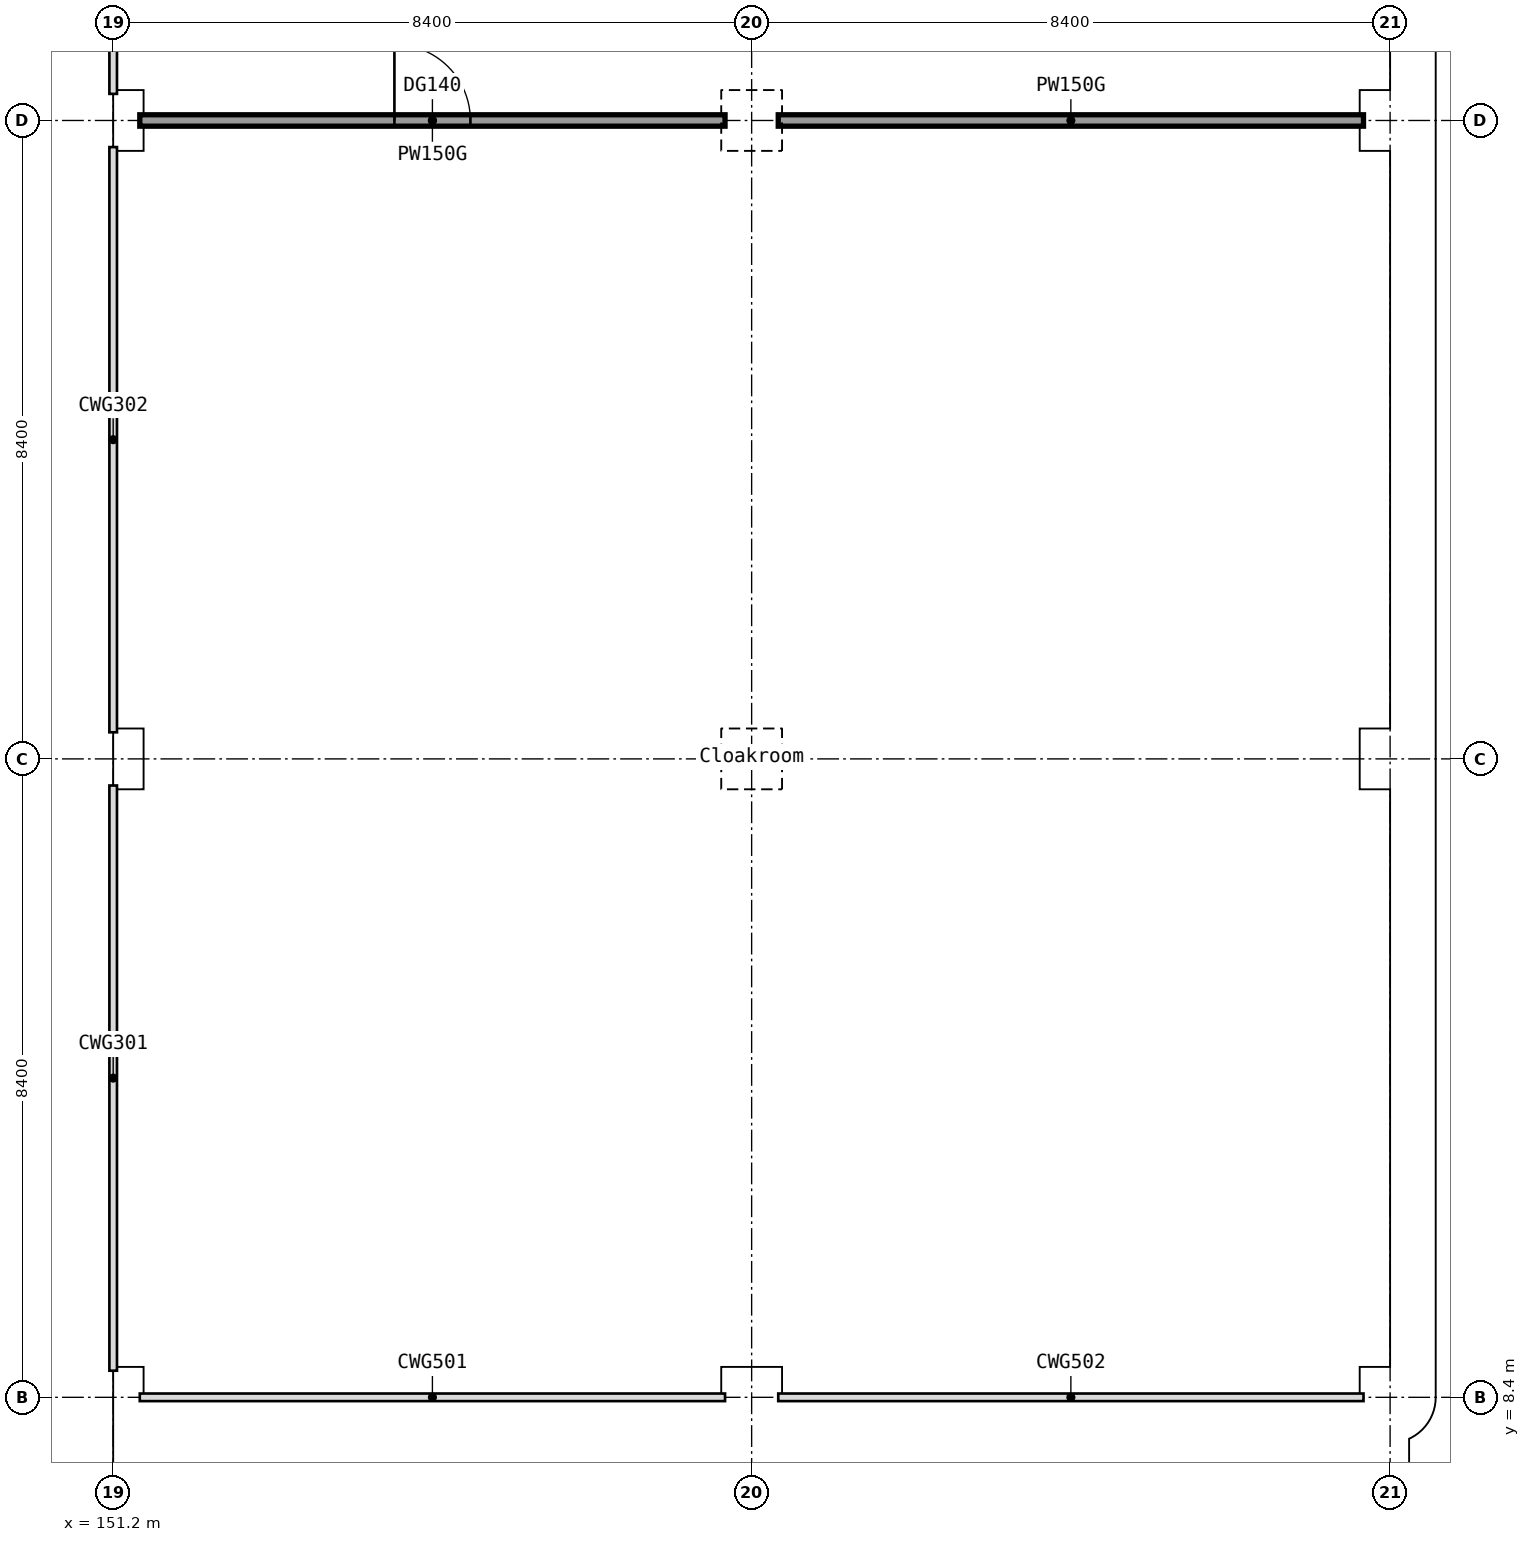
"""IFC4 building model, lengths in metres.
Left out: names, types, materials, properties, quantities, classifications, styles, units other than length and angle.
Written with IfcOpenShell. Run it as: python <this file> out.ifc"""

import sys

from ifc_helpers import new_model, si_unit, direction, frame, frame_2d, origin, origin_2d, place, context, subcontext, project, spatial, rectangle, extrude, element, fill, save


model = new_model("IFC4")
c1 = context("Model", 3, precision=1e-05, world=origin(), true_north=direction((0.0, 1.0)))
c2 = subcontext(c1, "Body", "Model", "MODEL_VIEW")
j1 = project(units=[si_unit("LENGTHUNIT", "METRE"), si_unit("PLANEANGLEUNIT", "RADIAN")], contexts=[c1])
p1 = place(None, origin())
s1 = spatial("IfcSite", under=j1, at=p1, CompositionType="ELEMENT")
p2 = place(p1, origin())
s2 = spatial("IfcBuilding", under=s1, at=p2, CompositionType="ELEMENT")
p3 = place(p2, origin())
s3 = spatial("IfcBuildingStorey", under=s2, at=p3, CompositionType="ELEMENT", Elevation=0.0)
for number, where, z_axis, x_axis in (
    (1, (151.2, 8.4, 0.0), (0.0, 0.0, 1.0), (1.0, 0.0, 0.0)),
    (2, (151.2, 16.8, 0.0), (0.0, 0.0, 1.0), (1.0, 0.0, 0.0)),
    (3, (151.2, 25.2, 0.0), (0.0, 0.0, 1.0), (1.0, 0.0, 0.0)),
    (4, (159.6, 8.4, 0.0), (0.0, 0.0, 1.0), (1.0, 0.0, 0.0)),
    (5, (159.6, 16.8, 0.0), (0.0, 0.0, 1.0), (1.0, 0.0, 0.0)),
    (6, (159.6, 25.2, 0.0), (0.0, 0.0, 1.0), (1.0, 0.0, 0.0)),
    (7, (168.0, 8.4, 0.0), (0.0, 0.0, 1.0), (1.0, 0.0, 0.0)),
    (8, (168.0, 16.8, 0.0), (0.0, 0.0, 1.0), (1.0, 0.0, 0.0)),
    (9, (168.0, 25.2, 0.0), (0.0, 0.0, 1.0), (1.0, 0.0, 0.0)),
):
    element("IfcColumn", number, at=place(p3, frame(where, z_axis=z_axis, x_axis=x_axis)), inside=s3, PredefinedType="COLUMN", context=c2, shape_type="SweptSolid", body=[
        extrude(rectangle(XDim=0.7, YDim=0.7, at=origin_2d()), origin(), (0.0, 0.0, 1.0), 6.0),
    ])
p4 = place(p3, frame((151.55, 25.2, 0.0), z_axis=(0.0, 0.0, 1.0), x_axis=(1.0, 0.0, 0.0)))
e10 = element("IfcWall", 10, at=p4, inside=s3, PredefinedType="PARTITIONING", context=c2, shape_type="SweptSolid", body=[
    extrude(rectangle(XDim=7.7, YDim=0.15, at=frame_2d((3.85, 0.0))), origin(), (0.0, 0.0, 1.0), 6.0),
])
p5 = place(p4, frame((3.35, 0.0, 0.0)))
e11 = element("IfcOpeningElement", 11, at=p5, cuts=e10, PredefinedType="OPENING", context=c2, shape_type="SweptSolid", body=[
    extrude(rectangle(XDim=1.0, YDim=2.1, at=frame_2d((0.5, 1.05))), frame((0.0, 0.075, 0.0), z_axis=(0.0, -1.0, 0.0), x_axis=(1.0, 0.0, 0.0)), (0.0, 0.0, 1.0), 0.15),
])
p6 = place(p3, frame((159.95, 25.2, 0.0), z_axis=(0.0, 0.0, 1.0), x_axis=(1.0, 0.0, 0.0)))
e12 = element("IfcWall", 12, at=p6, inside=s3, PredefinedType="PARTITIONING", context=c2, shape_type="SweptSolid", body=[
    extrude(rectangle(XDim=7.7, YDim=0.15, at=frame_2d((3.85, 0.0))), origin(), (0.0, 0.0, 1.0), 6.0),
])
p7 = place(p5, origin())
e13 = element("IfcDoor", 13, at=p7, inside=s3, OperationType="SINGLE_SWING_LEFT", PredefinedType="DOOR", context=c2, shape_type="SweptSolid", body=[
    extrude(rectangle(XDim=1.0, YDim=2.1, at=frame_2d((0.5, 1.05))), frame((0.0, 0.025, 0.0), z_axis=(0.0, -1.0, 0.0), x_axis=(1.0, 0.0, 0.0)), (0.0, 0.0, 1.0), 0.05),
])
fill(e11, e13)
save(model, sys.argv[1])
